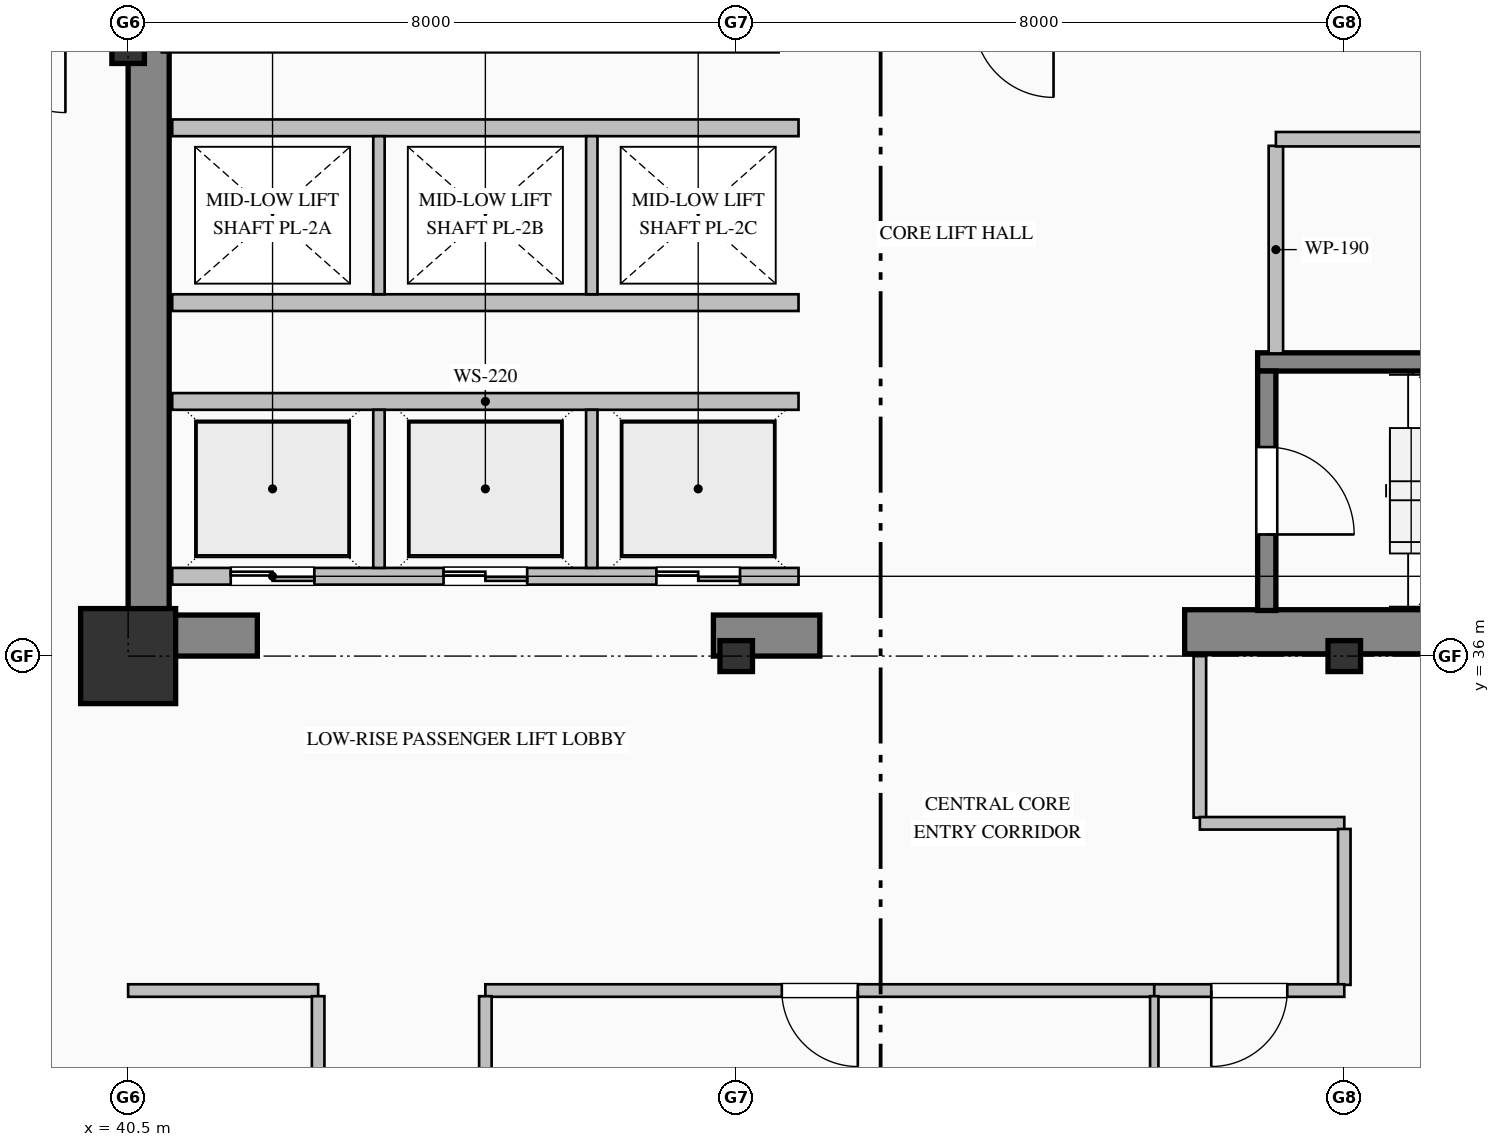
"""IFC4 building model, lengths in metres.
Left out: names, types, materials, properties, quantities, classifications, styles, units other than length and angle.
Written with IfcOpenShell. Run it as: python <this file> out.ifc"""

import sys

from ifc_helpers import new_model, si_unit, direction, frame, frame_2d, origin, origin_2d, place, context, subcontext, project, spatial, rectangle, hollow_rectangle, i_section, extrude, element, fill, save


model = new_model("IFC4")
c1 = context("Model", 3, precision=1e-05, world=origin(), true_north=direction((0.0, 1.0)))
c2 = subcontext(c1, "Body", "Model", "MODEL_VIEW")
j1 = project(units=[si_unit("LENGTHUNIT", "METRE"), si_unit("PLANEANGLEUNIT", "RADIAN")], contexts=[c1])
p1 = place(None, origin())
s1 = spatial("IfcSite", under=j1, at=p1, CompositionType="ELEMENT")
p2 = place(p1, origin())
s2 = spatial("IfcBuilding", under=s1, at=p2, CompositionType="ELEMENT")
p3 = place(p2, frame((0.0, 0.0, 88.2)))
s3 = spatial("IfcBuildingStorey", under=s2, at=p3, CompositionType="ELEMENT", Elevation=88.2)
p4 = place(p3, frame((40.77, 36.54, 0.0), z_axis=(0.0, 0.0, 1.0), x_axis=(0.0, 1.0, 0.0)))
e1 = element("IfcWall", 1, at=p4, inside=s3, PredefinedType="SHEAR", context=c2, shape_type="SweptSolid", body=[
    extrude(rectangle(XDim=7.86, YDim=0.54, at=frame_2d((3.93, 0.0))), origin(), (0.0, 0.0, 1.0), 3.75),
])
p5 = place(p3, frame((40.5, 36.27, 0.0), z_axis=(0.0, 0.0, 1.0), x_axis=(1.0, 0.0, 0.0)))
e2 = element("IfcWall", 2, at=p5, inside=s3, PredefinedType="SHEAR", context=c2, shape_type="SweptSolid", body=[
    extrude(rectangle(XDim=1.7, YDim=0.54, at=frame_2d((0.85, 0.0))), origin(), (0.0, 0.0, 1.0), 3.75),
])
p6 = place(p3, frame((48.2, 36.27, 0.0), z_axis=(0.0, 0.0, 1.0), x_axis=(1.0, 0.0, 0.0)))
e3 = element("IfcWall", 3, at=p6, inside=s3, PredefinedType="SHEAR", context=c2, shape_type="SweptSolid", body=[
    extrude(rectangle(XDim=1.4, YDim=0.54, at=frame_2d((0.7, 0.0))), origin(), (0.0, 0.0, 1.0), 3.75),
])
p7 = place(p3, frame((54.4, 36.32, 0.0), z_axis=(0.0, 0.0, 1.0), x_axis=(1.0, 0.0, 0.0)))
e4 = element("IfcWall", 4, at=p7, inside=s3, PredefinedType="SHEAR", context=c2, shape_type="SweptSolid", body=[
    extrude(rectangle(XDim=9.6, YDim=0.58, at=frame_2d((4.8, 0.0))), origin(), (0.0, 0.0, 1.0), 4.0),
])
p8 = place(p3, frame((40.5, 36.0, 0.0), z_axis=(0.0, 0.0, 1.0), x_axis=(1.0, 0.0, 0.0)))
e5 = element("IfcColumn", 5, at=p8, inside=s3, PredefinedType="COLUMN", context=c2, shape_type="SweptSolid", body=[
    extrude(hollow_rectangle(XDim=1.25, YDim=1.25, WallThickness=0.045, at=origin_2d()), origin(), (0.0, 0.0, 1.0), 4.0),
])
for number, where, z_axis, x_axis in (
    (6, (40.5, 44.0, 0.0), (0.0, 0.0, 1.0), (1.0, 0.0, 0.0)),
    (7, (48.5, 36.0, 0.0), (0.0, 0.0, 1.0), (1.0, 0.0, 0.0)),
    (8, (56.5, 36.0, 0.0), (0.0, 0.0, 1.0), (1.0, 0.0, 0.0)),
):
    element("IfcColumn", number, at=place(p3, frame(where, z_axis=z_axis, x_axis=x_axis)), inside=s3, PredefinedType="COLUMN", context=c2, shape_type="SweptSolid", body=[
        extrude(i_section(OverallWidth=0.407, OverallDepth=0.428, WebThickness=0.02, FlangeThickness=0.035, FilletRadius=0.022, at=origin_2d()), origin(), (0.0, 0.0, 1.0), 4.0),
    ])
p9 = place(p3, frame((55.36, 39.87, 0.0), z_axis=(0.0, 0.0, 1.0), x_axis=(1.0, 0.0, 0.0)))
e9 = element("IfcWall", 9, at=p9, inside=s3, PredefinedType="SOLIDWALL", context=c2, shape_type="SweptSolid", body=[
    extrude(rectangle(XDim=8.08, YDim=0.24, at=frame_2d((4.04, 0.0))), origin(), (0.0, 0.0, 1.0), 4.0),
])
p10 = place(p3, frame((55.48, 39.75, 0.0), z_axis=(0.0, 0.0, 1.0), x_axis=(0.0, -1.0, 0.0)))
e10 = element("IfcWall", 10, at=p10, inside=s3, PredefinedType="SOLIDWALL", context=c2, shape_type="SweptSolid", body=[
    extrude(rectangle(XDim=3.15, YDim=0.24, at=frame_2d((1.575, 0.0))), origin(), (0.0, 0.0, 1.0), 4.0),
])
p11 = place(p10, frame((1.0, 0.0, 0.0)))
e11 = element("IfcOpeningElement", 11, at=p11, cuts=e10, PredefinedType="OPENING", context=c2, shape_type="SweptSolid", body=[
    extrude(rectangle(XDim=1.15, YDim=2.2, at=frame_2d((0.575, 1.1))), frame((0.0, 0.13, 0.0), z_axis=(0.0, -1.0, 0.0), x_axis=(1.0, 0.0, 0.0)), (0.0, 0.0, 1.0), 0.26),
])
p12 = place(p3, frame((49.32, 37.05, 0.0), z_axis=(0.0, 0.0, 1.0), x_axis=(-1.0, 0.0, 0.0)))
e12 = element("IfcWall", 12, at=p12, inside=s3, PredefinedType="PARTITIONING", context=c2, shape_type="SweptSolid", body=[
    extrude(rectangle(XDim=8.24, YDim=0.22, at=frame_2d((4.12, 0.0))), origin(), (0.0, 0.0, 1.0), 3.75),
])
p13 = place(p12, frame((6.37, 0.0, 0.0)))
e13 = element("IfcOpeningElement", 13, at=p13, cuts=e12, PredefinedType="OPENING", context=c2, shape_type="SweptSolid", body=[
    extrude(rectangle(XDim=1.1, YDim=2.2, at=frame_2d((0.55, 1.1))), frame((0.0, 0.12, 0.0), z_axis=(0.0, -1.0, 0.0), x_axis=(1.0, 0.0, 0.0)), (0.0, 0.0, 1.0), 0.24),
])
p14 = place(p12, frame((3.57, 0.0, 0.0)))
e14 = element("IfcOpeningElement", 14, at=p14, cuts=e12, PredefinedType="OPENING", context=c2, shape_type="SweptSolid", body=[
    extrude(rectangle(XDim=1.1, YDim=2.2, at=frame_2d((0.55, 1.1))), frame((0.0, 0.12, 0.0), z_axis=(0.0, -1.0, 0.0), x_axis=(1.0, 0.0, 0.0)), (0.0, 0.0, 1.0), 0.24),
])
p15 = place(p12, frame((0.77, 0.0, 0.0)))
e15 = element("IfcOpeningElement", 15, at=p15, cuts=e12, PredefinedType="OPENING", context=c2, shape_type="SweptSolid", body=[
    extrude(rectangle(XDim=1.1, YDim=2.2, at=frame_2d((0.55, 1.1))), frame((0.0, 0.12, 0.0), z_axis=(0.0, -1.0, 0.0), x_axis=(1.0, 0.0, 0.0)), (0.0, 0.0, 1.0), 0.24),
])
p16 = place(p3, frame((41.08, 39.35, 0.0), z_axis=(0.0, 0.0, 1.0), x_axis=(1.0, 0.0, 0.0)))
e16 = element("IfcWall", 16, at=p16, inside=s3, PredefinedType="PARTITIONING", context=c2, shape_type="SweptSolid", body=[
    extrude(rectangle(XDim=8.24, YDim=0.22, at=frame_2d((4.12, 0.0))), origin(), (0.0, 0.0, 1.0), 3.75),
])
for number, where, z_axis, x_axis in (
    (17, (43.8, 37.16, 0.0), (0.0, 0.0, 1.0), (0.0, 1.0, 0.0)),
    (18, (46.6, 37.16, 0.0), (0.0, 0.0, 1.0), (0.0, 1.0, 0.0)),
):
    element("IfcWall", number, at=place(p3, frame(where, z_axis=z_axis, x_axis=x_axis)), inside=s3, PredefinedType="PARTITIONING", context=c2, shape_type="SweptSolid", body=[
        extrude(rectangle(XDim=2.08, YDim=0.15, at=frame_2d((1.04, 0.0))), origin(), (0.0, 0.0, 1.0), 3.75),
    ])
for number, where, z_axis, x_axis in (
    (19, (49.32, 40.65, 0.0), (0.0, 0.0, 1.0), (-1.0, 0.0, 0.0)),
    (20, (41.08, 42.95, 0.0), (0.0, 0.0, 1.0), (1.0, 0.0, 0.0)),
):
    element("IfcWall", number, at=place(p3, frame(where, z_axis=z_axis, x_axis=x_axis)), inside=s3, PredefinedType="PARTITIONING", context=c2, shape_type="SweptSolid", body=[
        extrude(rectangle(XDim=8.24, YDim=0.22, at=frame_2d((4.12, 0.0))), origin(), (0.0, 0.0, 1.0), 3.75),
    ])
for number, where, z_axis, x_axis in (
    (21, (43.8, 40.76, 0.0), (0.0, 0.0, 1.0), (0.0, 1.0, 0.0)),
    (22, (46.6, 40.76, 0.0), (0.0, 0.0, 1.0), (0.0, 1.0, 0.0)),
):
    element("IfcWall", number, at=place(p3, frame(where, z_axis=z_axis, x_axis=x_axis)), inside=s3, PredefinedType="PARTITIONING", context=c2, shape_type="SweptSolid", body=[
        extrude(rectangle(XDim=2.08, YDim=0.15, at=frame_2d((1.04, 0.0))), origin(), (0.0, 0.0, 1.0), 3.75),
    ])
p17 = place(p3, frame((55.6, 42.713, 0.0), z_axis=(0.0, 0.0, 1.0), x_axis=(0.0, -1.0, 0.0)))
e23 = element("IfcWall", 23, at=p17, inside=s3, PredefinedType="PARTITIONING", context=c2, shape_type="SweptSolid", body=[
    extrude(rectangle(XDim=2.731, YDim=0.19, at=frame_2d((1.365, 0.0))), origin(), (0.0, 0.0, 1.0), 3.75),
])
p18 = place(p3, frame((63.46, 42.8, 0.0), z_axis=(0.0, 0.0, 1.0), x_axis=(-1.0, 0.0, 0.0)))
e24 = element("IfcWall", 24, at=p18, inside=s3, PredefinedType="PARTITIONING", context=c2, shape_type="SweptSolid", body=[
    extrude(rectangle(XDim=7.86, YDim=0.19, at=frame_2d((3.93, 0.0))), origin(), (0.0, 0.0, 1.0), 3.75),
])
p19 = place(p18, frame((3.23, 0.0, 0.0)))
e25 = element("IfcOpeningElement", 25, at=p19, cuts=e24, PredefinedType="OPENING", context=c2, shape_type="SweptSolid", body=[
    extrude(rectangle(XDim=1.4, YDim=2.25, at=frame_2d((0.7, 1.125))), frame((0.0, 0.105, 0.0), z_axis=(0.0, -1.0, 0.0), x_axis=(1.0, 0.0, 0.0)), (0.0, 0.0, 1.0), 0.21),
])
p20 = place(p3, frame((54.0, 31.6, 0.0), z_axis=(0.0, 0.0, 1.0), x_axis=(-1.0, 0.0, 0.0)))
e26 = element("IfcWall", 26, at=p20, inside=s3, PredefinedType="PARTITIONING", context=c2, shape_type="SweptSolid", body=[
    extrude(rectangle(XDim=8.8, YDim=0.165, at=frame_2d((4.4, 0.0))), origin(), (0.0, 0.0, 1.0), 3.75),
])
p21 = place(p20, frame((3.9, 0.0, 0.0)))
e27 = element("IfcOpeningElement", 27, at=p21, cuts=e26, PredefinedType="OPENING", context=c2, shape_type="SweptSolid", body=[
    extrude(rectangle(XDim=1.0, YDim=2.15, at=frame_2d((0.5, 1.075))), frame((0.0, 0.093, 0.0), z_axis=(0.0, -1.0, 0.0), x_axis=(1.0, 0.0, 0.0)), (0.0, 0.0, 1.0), 0.185),
])
p22 = place(p3, frame((54.6, 36.0, 0.0), z_axis=(0.0, 0.0, 1.0), x_axis=(0.0, -1.0, 0.0)))
e28 = element("IfcWall", 28, at=p22, inside=s3, PredefinedType="PARTITIONING", context=c2, shape_type="SweptSolid", body=[
    extrude(rectangle(XDim=2.125, YDim=0.165, at=frame_2d((1.063, 0.0))), origin(), (0.0, 0.0, 1.0), 3.75),
])
p23 = place(p3, frame((54.6, 33.8, 0.0), z_axis=(0.0, 0.0, 1.0), x_axis=(1.0, 0.0, 0.0)))
e29 = element("IfcWall", 29, at=p23, inside=s3, PredefinedType="PARTITIONING", context=c2, shape_type="SweptSolid", body=[
    extrude(rectangle(XDim=1.9, YDim=0.165, at=frame_2d((0.95, 0.0))), origin(), (0.0, 0.0, 1.0), 3.75),
])
p24 = place(p3, frame((56.5, 33.726, 0.0), z_axis=(0.0, 0.0, 1.0), x_axis=(0.0, -1.0, 0.0)))
e30 = element("IfcWall", 30, at=p24, inside=s3, PredefinedType="PARTITIONING", context=c2, shape_type="SweptSolid", body=[
    extrude(rectangle(XDim=2.051, YDim=0.165, at=frame_2d((1.025, 0.0))), origin(), (0.0, 0.0, 1.0), 3.042),
])
p25 = place(p3, frame((56.5, 31.6, 0.0), z_axis=(0.0, 0.0, 1.0), x_axis=(-1.0, 0.0, 0.0)))
e31 = element("IfcWall", 31, at=p25, inside=s3, PredefinedType="PARTITIONING", context=c2, shape_type="SweptSolid", body=[
    extrude(rectangle(XDim=2.5, YDim=0.165, at=frame_2d((1.25, 0.0))), origin(), (0.0, 0.0, 1.0), 3.75),
])
p26 = place(p25, frame((0.75, 0.0, 0.0)))
e32 = element("IfcOpeningElement", 32, at=p26, cuts=e31, PredefinedType="OPENING", context=c2, shape_type="SweptSolid", body=[
    extrude(rectangle(XDim=1.0, YDim=2.15, at=frame_2d((0.5, 1.075))), frame((0.0, 0.093, 0.0), z_axis=(0.0, -1.0, 0.0), x_axis=(1.0, 0.0, 0.0)), (0.0, 0.0, 1.0), 0.185),
])
p27 = place(p3, frame((43.0, 31.6, 0.0), z_axis=(0.0, 0.0, 1.0), x_axis=(-1.0, 0.0, 0.0)))
e33 = element("IfcWall", 33, at=p27, inside=s3, PredefinedType="PARTITIONING", context=c2, shape_type="SweptSolid", body=[
    extrude(rectangle(XDim=2.5, YDim=0.165, at=frame_2d((1.25, 0.0))), origin(), (0.0, 0.0, 1.0), 3.75),
])
p28 = place(p3, frame((45.2, 31.525, 0.0), z_axis=(0.0, 0.0, 1.0), x_axis=(0.0, -1.0, 0.0)))
e34 = element("IfcWall", 34, at=p28, inside=s3, PredefinedType="PARTITIONING", context=c2, shape_type="SweptSolid", body=[
    extrude(rectangle(XDim=6.128, YDim=0.165, at=frame_2d((3.064, 0.0))), origin(), (0.0, 0.0, 1.0), 3.75),
])
p29 = place(p3, frame((43.0, 12.574, 0.0), z_axis=(0.0, 0.0, 1.0), x_axis=(0.0, 1.0, 0.0)))
e35 = element("IfcWall", 35, at=p29, inside=s3, PredefinedType="PARTITIONING", context=c2, shape_type="SweptSolid", body=[
    extrude(rectangle(XDim=18.951, YDim=0.165, at=frame_2d((9.476, 0.0))), origin(), (0.0, 0.0, 1.0), 3.75),
])
p30 = place(p29, frame((9.025, 0.0, 0.0)))
e36 = element("IfcOpeningElement", 36, at=p30, cuts=e35, PredefinedType="OPENING", context=c2, shape_type="SweptSolid", body=[
    extrude(rectangle(XDim=0.9, YDim=2.15, at=frame_2d((0.45, 1.075))), frame((0.0, 0.093, 0.0), z_axis=(0.0, -1.0, 0.0), x_axis=(1.0, 0.0, 0.0)), (0.0, 0.0, 1.0), 0.185),
])
p31 = place(p3, frame((54.0, 31.525, 0.0), z_axis=(0.0, 0.0, 1.0), x_axis=(0.0, -1.0, 0.0)))
e37 = element("IfcWall", 37, at=p31, inside=s3, PredefinedType="MOVABLE", context=c2, shape_type="SweptSolid", body=[
    extrude(rectangle(XDim=6.128, YDim=0.11, at=frame_2d((3.064, 0.0))), origin(), (0.0, 0.0, 1.0), 3.75),
])
p32 = place(p11, origin())
e38 = element("IfcDoor", 38, at=p32, inside=s3, OperationType="SINGLE_SWING_RIGHT", PredefinedType="DOOR", context=c2, shape_type="SweptSolid", body=[
    extrude(rectangle(XDim=1.15, YDim=2.2, at=frame_2d((0.575, 1.1))), frame((0.0, 0.025, 0.0), z_axis=(0.0, -1.0, 0.0), x_axis=(1.0, 0.0, 0.0)), (0.0, 0.0, 1.0), 0.05),
])
fill(e11, e38)
p33 = place(p13, origin())
e39 = element("IfcDoor", 39, at=p33, inside=s3, OperationType="DOUBLE_DOOR_SLIDING", PredefinedType="DOOR", context=c2, shape_type="SweptSolid", body=[
    extrude(rectangle(XDim=1.1, YDim=2.2, at=frame_2d((0.55, 1.1))), frame((0.0, 0.025, 0.0), z_axis=(0.0, -1.0, 0.0), x_axis=(1.0, 0.0, 0.0)), (0.0, 0.0, 1.0), 0.05),
])
fill(e13, e39)
p34 = place(p14, origin())
e40 = element("IfcDoor", 40, at=p34, inside=s3, OperationType="DOUBLE_DOOR_SLIDING", PredefinedType="DOOR", context=c2, shape_type="SweptSolid", body=[
    extrude(rectangle(XDim=1.1, YDim=2.2, at=frame_2d((0.55, 1.1))), frame((0.0, 0.025, 0.0), z_axis=(0.0, -1.0, 0.0), x_axis=(1.0, 0.0, 0.0)), (0.0, 0.0, 1.0), 0.05),
])
fill(e14, e40)
p35 = place(p15, origin())
e41 = element("IfcDoor", 41, at=p35, inside=s3, OperationType="DOUBLE_DOOR_SLIDING", PredefinedType="DOOR", context=c2, shape_type="SweptSolid", body=[
    extrude(rectangle(XDim=1.1, YDim=2.2, at=frame_2d((0.55, 1.1))), frame((0.0, 0.025, 0.0), z_axis=(0.0, -1.0, 0.0), x_axis=(1.0, 0.0, 0.0)), (0.0, 0.0, 1.0), 0.05),
])
fill(e15, e41)
p36 = place(p21, origin())
e42 = element("IfcDoor", 42, at=p36, inside=s3, OperationType="SINGLE_SWING_LEFT", PredefinedType="DOOR", context=c2, shape_type="SweptSolid", body=[
    extrude(rectangle(XDim=1.0, YDim=2.15, at=frame_2d((0.5, 1.075))), frame((0.0, 0.025, 0.0), z_axis=(0.0, -1.0, 0.0), x_axis=(1.0, 0.0, 0.0)), (0.0, 0.0, 1.0), 0.05),
])
fill(e27, e42)
p37 = place(p26, origin())
e43 = element("IfcDoor", 43, at=p37, inside=s3, OperationType="SINGLE_SWING_RIGHT", PredefinedType="DOOR", context=c2, shape_type="SweptSolid", body=[
    extrude(rectangle(XDim=1.0, YDim=2.15, at=frame_2d((0.5, 1.075))), frame((0.0, 0.025, 0.0), z_axis=(0.0, -1.0, 0.0), x_axis=(1.0, 0.0, 0.0)), (0.0, 0.0, 1.0), 0.05),
])
fill(e32, e43)
save(model, sys.argv[1])
